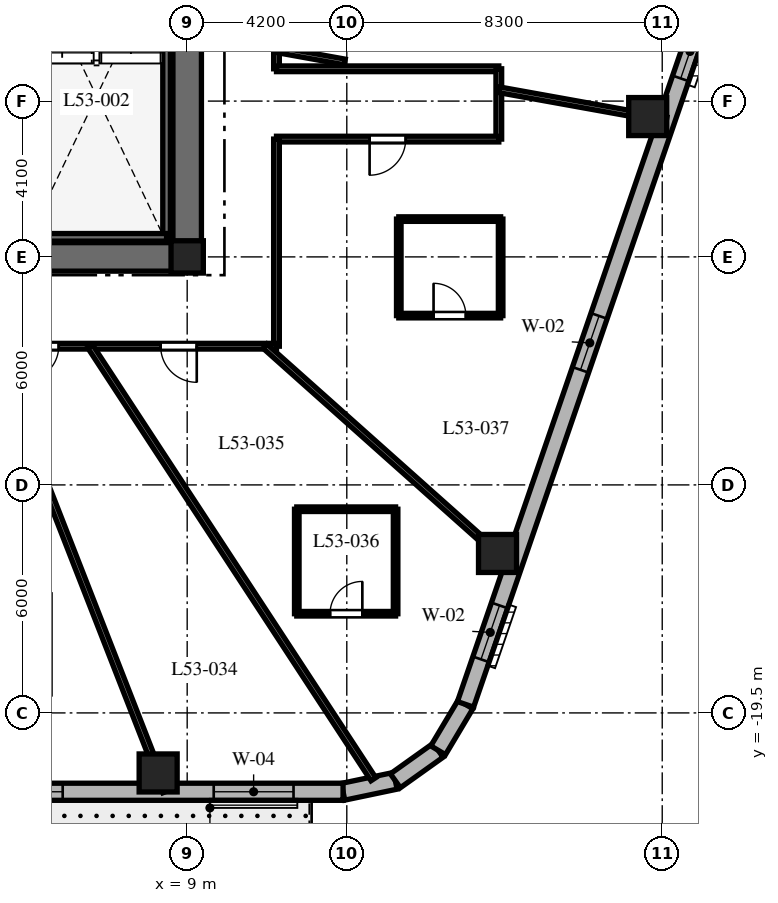
"""IFC4 building model, lengths in metres.
Left out: names, types, materials, properties, quantities, classifications, styles, units other than length and angle.
Written with IfcOpenShell. Run it as: python <this file> out.ifc"""

import sys

from ifc_helpers import new_model, si_unit, direction, frame, frame_2d, origin, origin_2d, place, context, subcontext, project, spatial, rectangle, extrude, element, fill, save


model = new_model("IFC4")
c1 = context("Model", 3, precision=1e-05, world=origin(), true_north=direction((0.0, 1.0)))
c2 = subcontext(c1, "Body", "Model", "MODEL_VIEW")
j1 = project(units=[si_unit("LENGTHUNIT", "METRE"), si_unit("PLANEANGLEUNIT", "RADIAN")], contexts=[c1])
p1 = place(None, origin())
s1 = spatial("IfcSite", under=j1, at=p1, CompositionType="ELEMENT")
p2 = place(p1, origin())
s2 = spatial("IfcBuilding", under=s1, at=p2, CompositionType="ELEMENT")
p3 = place(p2, frame((0.0, 0.0, 214.1)))
s3 = spatial("IfcBuildingStorey", under=s2, at=p3, CompositionType="ELEMENT", Elevation=214.1)
p4 = place(p3, frame((-9.375, -7.5, 0.0), z_axis=(0.0, 0.0, 1.0), x_axis=(1.0, 0.0, 0.0)))
e1 = element("IfcWall", 1, at=p4, inside=s3, PredefinedType="SHEAR", context=c2, shape_type="SweptSolid", body=[
    extrude(rectangle(XDim=18.75, YDim=0.75, at=frame_2d((9.375, 0.0))), origin(), (0.0, 0.0, 1.0), 3.8),
])
p5 = place(p4, frame((9.425, 0.0, 0.0)))
e2 = element("IfcOpeningElement", 2, at=p5, cuts=e1, PredefinedType="OPENING", context=c2, shape_type="SweptSolid", body=[
    extrude(rectangle(XDim=1.0, YDim=2.15, at=frame_2d((0.5, 1.075))), frame((0.0, 0.385, 0.0), z_axis=(0.0, -1.0, 0.0), x_axis=(1.0, 0.0, 0.0)), (0.0, 0.0, 1.0), 0.77),
])
p6 = place(p3, frame((9.0, -7.125, 0.0), z_axis=(0.0, 0.0, 1.0), x_axis=(0.0, 1.0, 0.0)))
e3 = element("IfcWall", 3, at=p6, inside=s3, PredefinedType="SHEAR", context=c2, shape_type="SweptSolid", body=[
    extrude(rectangle(XDim=14.25, YDim=0.75, at=frame_2d((7.125, 0.0))), origin(), (0.0, 0.0, 1.0), 3.8),
])
p7 = place(p6, frame((10.25, 0.0, 0.0)))
e4 = element("IfcOpeningElement", 4, at=p7, cuts=e3, PredefinedType="OPENING", context=c2, shape_type="SweptSolid", body=[
    extrude(rectangle(XDim=1.05, YDim=2.15, at=frame_2d((0.525, 1.075))), frame((0.0, 0.385, 0.0), z_axis=(0.0, -1.0, 0.0), x_axis=(1.0, 0.0, 0.0)), (0.0, 0.0, 1.0), 0.77),
])
p8 = place(p3, frame((8.458, -6.985, 0.0), z_axis=(0.0, 0.0, 1.0), x_axis=(0.0, 1.0, 0.0)))
e5 = element("IfcWall", 5, at=p8, inside=s3, PredefinedType="SHEAR", context=c2, shape_type="SweptSolid", body=[
    extrude(rectangle(XDim=9.143, YDim=0.2, at=frame_2d((4.572, 0.0))), origin(), (0.0, 0.0, 1.0), 3.8),
])
p9 = place(p3, frame((4.772, -6.985, 0.0), z_axis=(0.0, 0.0, 1.0), x_axis=(1.0, 0.0, 0.0)))
e6 = element("IfcWall", 6, at=p9, inside=s3, PredefinedType="SHEAR", context=c2, shape_type="SweptSolid", body=[
    extrude(rectangle(XDim=3.686, YDim=0.2, at=frame_2d((1.843, 0.0))), origin(), (0.0, 0.0, 1.0), 3.8),
])
p10 = place(p3, frame((9.0, -7.5, 0.0), z_axis=(0.0, 0.0, 1.0), x_axis=(1.0, 0.0, 0.0)))
e7 = element("IfcColumn", 7, at=p10, inside=s3, PredefinedType="COLUMN", context=c2, shape_type="SweptSolid", body=[
    extrude(rectangle(XDim=0.85, YDim=0.85, at=origin_2d()), origin(), (0.0, 0.0, 1.0), 3.8),
])
for number, where, z_axis, x_axis in (
    (8, (8.236, -21.08, 0.0), (0.0, 0.0, 1.0), (1.0, 0.0, 0.0)),
    (9, (17.166, -15.304, 0.0), (0.0, 0.0, 1.0), (1.0, 0.0, 0.0)),
    (10, (21.118, -3.807, 0.0), (0.0, 0.0, 1.0), (1.0, 0.0, 0.0)),
):
    element("IfcColumn", number, at=place(p3, frame(where, z_axis=z_axis, x_axis=x_axis)), inside=s3, PredefinedType="COLUMN", context=c2, shape_type="SweptSolid", body=[
        extrude(rectangle(XDim=1.0, YDim=1.0, at=origin_2d()), origin(), (0.0, 0.0, 1.0), 3.8),
    ])
p11 = place(p3, frame((13.102, -21.575, 0.0), z_axis=(0.0, 0.0, 1.0), x_axis=(0.978757421505, 0.205021730188, 0.0)))
e11 = element("IfcWall", 11, at=p11, inside=s3, PredefinedType="SOLIDWALL", context=c2, shape_type="SweptSolid", body=[
    extrude(rectangle(XDim=1.406, YDim=0.45, at=frame_2d((0.703, 0.0))), origin(), (0.0, 0.0, 1.0), 3.5),
])
p12 = place(p3, frame((14.478, -21.287, 0.0), z_axis=(0.0, 0.0, 1.0), x_axis=(0.813888518617, 0.58102106611, 0.0)))
e12 = element("IfcWall", 12, at=p12, inside=s3, PredefinedType="SOLIDWALL", context=c2, shape_type="SweptSolid", body=[
    extrude(rectangle(XDim=1.383, YDim=0.45, at=frame_2d((0.691, 0.0))), origin(), (0.0, 0.0, 1.0), 3.5),
])
p13 = place(p3, frame((15.604, -20.483, 0.0), z_axis=(0.0, 0.0, 1.0), x_axis=(0.512222149036, 0.858852996756, 0.0)))
e13 = element("IfcWall", 13, at=p13, inside=s3, PredefinedType="SOLIDWALL", context=c2, shape_type="SweptSolid", body=[
    extrude(rectangle(XDim=1.406, YDim=0.45, at=frame_2d((0.703, 0.0))), origin(), (0.0, 0.0, 1.0), 3.5),
])
p14 = place(p3, frame((-11.298, -21.575, 0.0), z_axis=(0.0, 0.0, 1.0), x_axis=(1.0, 0.0, 0.0)))
e14 = element("IfcWall", 14, at=p14, inside=s3, PredefinedType="SOLIDWALL", context=c2, shape_type="SweptSolid", body=[
    extrude(rectangle(XDim=24.399, YDim=0.45, at=frame_2d((12.2, 0.0))), origin(), (0.0, 0.0, 1.0), 3.5),
])
p15 = place(p14, frame((2.55, 0.0, 0.0)))
e15 = element("IfcOpeningElement", 15, at=p15, cuts=e14, PredefinedType="OPENING", context=c2, shape_type="SweptSolid", body=[
    extrude(rectangle(XDim=1.0, YDim=2.15, at=frame_2d((0.5, 1.075))), frame((0.0, 0.235, 0.0), z_axis=(0.0, -1.0, 0.0), x_axis=(1.0, 0.0, 0.0)), (0.0, 0.0, 1.0), 0.47),
])
p16 = place(p14, frame((8.169, 0.0, 0.8)))
e16 = element("IfcOpeningElement", 16, at=p16, cuts=e14, PredefinedType="OPENING", context=c2, shape_type="SweptSolid", body=[
    extrude(rectangle(XDim=2.1, YDim=1.85, at=frame_2d((1.05, 0.925))), frame((0.0, 0.235, 0.0), z_axis=(0.0, -1.0, 0.0), x_axis=(1.0, 0.0, 0.0)), (0.0, 0.0, 1.0), 0.47),
])
p17 = place(p14, frame((14.922, 0.0, 0.8)))
e17 = element("IfcOpeningElement", 17, at=p17, cuts=e14, PredefinedType="OPENING", context=c2, shape_type="SweptSolid", body=[
    extrude(rectangle(XDim=2.1, YDim=1.85, at=frame_2d((1.05, 0.925))), frame((0.0, 0.235, 0.0), z_axis=(0.0, -1.0, 0.0), x_axis=(1.0, 0.0, 0.0)), (0.0, 0.0, 1.0), 0.47),
])
p18 = place(p14, frame((20.996, 0.0, 0.8)))
e18 = element("IfcOpeningElement", 18, at=p18, cuts=e14, PredefinedType="OPENING", context=c2, shape_type="SweptSolid", body=[
    extrude(rectangle(XDim=2.1, YDim=1.85, at=frame_2d((1.05, 0.925))), frame((0.0, 0.235, 0.0), z_axis=(0.0, -1.0, 0.0), x_axis=(1.0, 0.0, 0.0)), (0.0, 0.0, 1.0), 0.47),
])
p19 = place(p3, frame((16.324, -19.275, 0.0), z_axis=(0.0, 0.0, 1.0), x_axis=(0.325083142304, 0.945685439557, 0.0)))
e19 = element("IfcWall", 19, at=p19, inside=s3, PredefinedType="SOLIDWALL", context=c2, shape_type="SweptSolid", body=[
    extrude(rectangle(XDim=20.224, YDim=0.45, at=frame_2d((10.112, 0.0))), origin(), (0.0, 0.0, 1.0), 3.5),
])
p20 = place(p19, frame((1.253, 0.0, 0.8)))
e20 = element("IfcOpeningElement", 20, at=p20, cuts=e19, PredefinedType="OPENING", context=c2, shape_type="SweptSolid", body=[
    extrude(rectangle(XDim=1.5, YDim=1.8, at=frame_2d((0.75, 0.9))), frame((0.0, 0.235, 0.0), z_axis=(0.0, -1.0, 0.0), x_axis=(1.0, 0.0, 0.0)), (0.0, 0.0, 1.0), 0.47),
])
p21 = place(p19, frame((9.309, 0.0, 0.8)))
e21 = element("IfcOpeningElement", 21, at=p21, cuts=e19, PredefinedType="OPENING", context=c2, shape_type="SweptSolid", body=[
    extrude(rectangle(XDim=1.5, YDim=1.8, at=frame_2d((0.75, 0.9))), frame((0.0, 0.235, 0.0), z_axis=(0.0, -1.0, 0.0), x_axis=(1.0, 0.0, 0.0)), (0.0, 0.0, 1.0), 0.47),
])
p22 = place(p19, frame((17.418, 0.0, 0.8)))
e22 = element("IfcOpeningElement", 22, at=p22, cuts=e19, PredefinedType="OPENING", context=c2, shape_type="SweptSolid", body=[
    extrude(rectangle(XDim=1.5, YDim=1.8, at=frame_2d((0.75, 0.9))), frame((0.0, 0.235, 0.0), z_axis=(0.0, -1.0, 0.0), x_axis=(1.0, 0.0, 0.0)), (0.0, 0.0, 1.0), 0.47),
])
p23 = place(p3, frame((11.35, 9.85, 0.0), z_axis=(0.0, 0.0, 1.0), x_axis=(0.0, -1.0, 0.0)))
e23 = element("IfcWall", 23, at=p23, inside=s3, PredefinedType="PARTITIONING", context=c2, shape_type="SweptSolid", body=[
    extrude(rectangle(XDim=12.4, YDim=0.15, at=frame_2d((6.2, 0.0))), origin(), (0.0, 0.0, 1.0), 2.99),
])
p24 = place(p23, frame((3.01, 0.0, 0.0)))
e24 = element("IfcOpeningElement", 24, at=p24, cuts=e23, PredefinedType="OPENING", context=c2, shape_type="SweptSolid", body=[
    extrude(rectangle(XDim=0.95, YDim=2.03, at=frame_2d((0.475, 1.015))), frame((0.0, 0.085, 0.0), z_axis=(0.0, -1.0, 0.0), x_axis=(1.0, 0.0, 0.0)), (0.0, 0.0, 1.0), 0.17),
])
p25 = place(p23, frame((8.835, 0.0, 0.0)))
e25 = element("IfcOpeningElement", 25, at=p25, cuts=e23, PredefinedType="OPENING", context=c2, shape_type="SweptSolid", body=[
    extrude(rectangle(XDim=0.95, YDim=2.03, at=frame_2d((0.475, 1.015))), frame((0.0, 0.085, 0.0), z_axis=(0.0, -1.0, 0.0), x_axis=(1.0, 0.0, 0.0)), (0.0, 0.0, 1.0), 0.17),
])
p26 = place(p3, frame((11.35, -2.55, 0.0), z_axis=(0.0, 0.0, 1.0), x_axis=(1.0, 0.0, 0.0)))
e26 = element("IfcWall", 26, at=p26, inside=s3, PredefinedType="PARTITIONING", context=c2, shape_type="SweptSolid", body=[
    extrude(rectangle(XDim=5.85, YDim=0.15, at=frame_2d((2.925, 0.0))), origin(), (0.0, 0.0, 1.0), 2.94),
])
p27 = place(p3, frame((17.2, -2.55, 0.0), z_axis=(0.0, 0.0, 1.0), x_axis=(0.0, -1.0, 0.0)))
e27 = element("IfcWall", 27, at=p27, inside=s3, PredefinedType="PARTITIONING", context=c2, shape_type="SweptSolid", body=[
    extrude(rectangle(XDim=1.85, YDim=0.15, at=frame_2d((0.925, 0.0))), origin(), (0.0, 0.0, 1.0), 2.94),
])
p28 = place(p3, frame((17.2, -4.4, 0.0), z_axis=(0.0, 0.0, 1.0), x_axis=(-1.0, 0.0, 0.0)))
e28 = element("IfcWall", 28, at=p28, inside=s3, PredefinedType="PARTITIONING", context=c2, shape_type="SweptSolid", body=[
    extrude(rectangle(XDim=5.85, YDim=0.15, at=frame_2d((2.925, 0.0))), origin(), (0.0, 0.0, 1.0), 2.94),
])
p29 = place(p28, frame((2.45, 0.0, 0.0)))
e29 = element("IfcOpeningElement", 29, at=p29, cuts=e28, PredefinedType="OPENING", context=c2, shape_type="SweptSolid", body=[
    extrude(rectangle(XDim=0.95, YDim=2.03, at=frame_2d((0.475, 1.015))), frame((0.0, 0.085, 0.0), z_axis=(0.0, -1.0, 0.0), x_axis=(1.0, 0.0, 0.0)), (0.0, 0.0, 1.0), 0.17),
])
p30 = place(p3, frame((11.35, -4.4, 0.0), z_axis=(0.0, 0.0, 1.0), x_axis=(0.0, -1.0, 0.0)))
e30 = element("IfcWall", 30, at=p30, inside=s3, PredefinedType="PARTITIONING", context=c2, shape_type="SweptSolid", body=[
    extrude(rectangle(XDim=5.45, YDim=0.15, at=frame_2d((2.725, 0.0))), origin(), (0.0, 0.0, 1.0), 2.99),
])
p31 = place(p3, frame((11.35, -9.85, 0.0), z_axis=(0.0, 0.0, 1.0), x_axis=(-1.0, 0.0, 0.0)))
e31 = element("IfcWall", 31, at=p31, inside=s3, PredefinedType="PARTITIONING", context=c2, shape_type="SweptSolid", body=[
    extrude(rectangle(XDim=10.43, YDim=0.15, at=frame_2d((5.215, 0.0))), origin(), (0.0, 0.0, 1.0), 2.99),
])
p32 = place(p31, frame((8.362, 0.0, 0.0)))
e32 = element("IfcOpeningElement", 32, at=p32, cuts=e31, PredefinedType="OPENING", context=c2, shape_type="SweptSolid", body=[
    extrude(rectangle(XDim=0.95, YDim=2.03, at=frame_2d((0.475, 1.015))), frame((0.0, 0.085, 0.0), z_axis=(0.0, -1.0, 0.0), x_axis=(1.0, 0.0, 0.0)), (0.0, 0.0, 1.0), 0.17),
])
p33 = place(p31, frame((5.73, 0.0, 0.0)))
e33 = element("IfcOpeningElement", 33, at=p33, cuts=e31, PredefinedType="OPENING", context=c2, shape_type="SweptSolid", body=[
    extrude(rectangle(XDim=0.9, YDim=2.03, at=frame_2d((0.45, 1.015))), frame((0.0, 0.085, 0.0), z_axis=(0.0, -1.0, 0.0), x_axis=(1.0, 0.0, 0.0)), (0.0, 0.0, 1.0), 0.17),
])
p34 = place(p31, frame((2.098, 0.0, 0.0)))
e34 = element("IfcOpeningElement", 34, at=p34, cuts=e31, PredefinedType="OPENING", context=c2, shape_type="SweptSolid", body=[
    extrude(rectangle(XDim=0.95, YDim=2.03, at=frame_2d((0.475, 1.015))), frame((0.0, 0.085, 0.0), z_axis=(0.0, -1.0, 0.0), x_axis=(1.0, 0.0, 0.0)), (0.0, 0.0, 1.0), 0.17),
])
p35 = place(p3, frame((3.848, -9.85, 0.0), z_axis=(0.0, 0.0, 1.0), x_axis=(0.363921778212, -0.931429513889, 0.0)))
e35 = element("IfcWall", 35, at=p35, inside=s3, PredefinedType="PARTITIONING", context=c2, shape_type="SweptSolid", body=[
    extrude(rectangle(XDim=12.588, YDim=0.15, at=frame_2d((6.294, 0.0))), origin(), (0.0, 0.0, 1.0), 2.74),
])
p36 = place(p3, frame((6.444, -9.85, 0.0), z_axis=(0.0, 0.0, 1.0), x_axis=(0.547492333129, -0.836810698525, 0.0)))
e36 = element("IfcWall", 36, at=p36, inside=s3, PredefinedType="PARTITIONING", context=c2, shape_type="SweptSolid", body=[
    extrude(rectangle(XDim=13.616, YDim=0.15, at=frame_2d((6.808, 0.0))), origin(), (0.0, 0.0, 1.0), 2.74),
])
p37 = place(p3, frame((11.048, -9.85, 0.0), z_axis=(0.0, 0.0, 1.0), x_axis=(0.746444434655, -0.665447748492, 0.0)))
e37 = element("IfcWall", 37, at=p37, inside=s3, PredefinedType="PARTITIONING", context=c2, shape_type="SweptSolid", body=[
    extrude(rectangle(XDim=8.732, YDim=0.15, at=frame_2d((4.366, 0.0))), origin(), (0.0, 0.0, 1.0), 2.74),
])
p38 = place(p3, frame((11.35, -2.046, 0.0), z_axis=(0.0, 0.0, 1.0), x_axis=(0.984127783205, -0.177461281195, 0.0)))
e38 = element("IfcWall", 38, at=p38, inside=s3, PredefinedType="PARTITIONING", context=c2, shape_type="SweptSolid", body=[
    extrude(rectangle(XDim=1.826, YDim=0.15, at=frame_2d((0.913, 0.0))), origin(), (0.0, 0.0, 1.0), 3.5),
])
p39 = place(p3, frame((17.2, -3.101, 0.0), z_axis=(0.0, 0.0, 1.0), x_axis=(0.98413465883, -0.177423147559, 0.0)))
e39 = element("IfcWall", 39, at=p39, inside=s3, PredefinedType="PARTITIONING", context=c2, shape_type="SweptSolid", body=[
    extrude(rectangle(XDim=4.482, YDim=0.15, at=frame_2d((2.241, 0.0))), origin(), (0.0, 0.0, 1.0), 2.74),
])
p40 = place(p3, frame((11.884, -16.89, 0.0), z_axis=(0.0, 0.0, 1.0), x_axis=(1.0, 0.0, 0.0)))
e40 = element("IfcWall", 40, at=p40, inside=s3, PredefinedType="PARTITIONING", context=c2, shape_type="SweptSolid", body=[
    extrude(rectangle(XDim=2.6, YDim=0.12, at=frame_2d((1.3, 0.0))), origin(), (0.0, 0.0, 1.0), 2.74),
])
p41 = place(p40, frame((0.875, 0.0, 0.0)))
e41 = element("IfcOpeningElement", 41, at=p41, cuts=e40, PredefinedType="OPENING", context=c2, shape_type="SweptSolid", body=[
    extrude(rectangle(XDim=0.85, YDim=2.03, at=frame_2d((0.425, 1.015))), frame((0.0, 0.07, 0.0), z_axis=(0.0, -1.0, 0.0), x_axis=(1.0, 0.0, 0.0)), (0.0, 0.0, 1.0), 0.14),
])
p42 = place(p3, frame((14.484, -16.89, 0.0), z_axis=(0.0, 0.0, 1.0), x_axis=(0.0, 1.0, 0.0)))
e42 = element("IfcWall", 42, at=p42, inside=s3, PredefinedType="PARTITIONING", context=c2, shape_type="SweptSolid", body=[
    extrude(rectangle(XDim=2.75, YDim=0.12, at=frame_2d((1.375, 0.0))), origin(), (0.0, 0.0, 1.0), 2.74),
])
p43 = place(p3, frame((14.484, -14.14, 0.0), z_axis=(0.0, 0.0, 1.0), x_axis=(-1.0, 0.0, 0.0)))
e43 = element("IfcWall", 43, at=p43, inside=s3, PredefinedType="PARTITIONING", context=c2, shape_type="SweptSolid", body=[
    extrude(rectangle(XDim=2.6, YDim=0.12, at=frame_2d((1.3, 0.0))), origin(), (0.0, 0.0, 1.0), 3.026),
])
p44 = place(p3, frame((11.884, -14.14, 0.0), z_axis=(0.0, 0.0, 1.0), x_axis=(0.0, -1.0, 0.0)))
e44 = element("IfcWall", 44, at=p44, inside=s3, PredefinedType="PARTITIONING", context=c2, shape_type="SweptSolid", body=[
    extrude(rectangle(XDim=2.75, YDim=0.12, at=frame_2d((1.375, 0.0))), origin(), (0.0, 0.0, 1.0), 3.026),
])
p45 = place(p3, frame((14.568, -9.045, 0.0), z_axis=(0.0, 0.0, 1.0), x_axis=(1.0, 0.0, 0.0)))
e45 = element("IfcWall", 45, at=p45, inside=s3, PredefinedType="PARTITIONING", context=c2, shape_type="SweptSolid", body=[
    extrude(rectangle(XDim=2.68, YDim=0.12, at=frame_2d((1.34, 0.0))), origin(), (0.0, 0.0, 1.0), 3.072),
])
p46 = place(p45, frame((0.915, 0.0, 0.0)))
e46 = element("IfcOpeningElement", 46, at=p46, cuts=e45, PredefinedType="OPENING", context=c2, shape_type="SweptSolid", body=[
    extrude(rectangle(XDim=0.85, YDim=2.03, at=frame_2d((0.425, 1.015))), frame((0.0, 0.07, 0.0), z_axis=(0.0, -1.0, 0.0), x_axis=(1.0, 0.0, 0.0)), (0.0, 0.0, 1.0), 0.14),
])
p47 = place(p3, frame((17.248, -9.045, 0.0), z_axis=(0.0, 0.0, 1.0), x_axis=(0.0, 1.0, 0.0)))
e47 = element("IfcWall", 47, at=p47, inside=s3, PredefinedType="PARTITIONING", context=c2, shape_type="SweptSolid", body=[
    extrude(rectangle(XDim=2.54, YDim=0.12, at=frame_2d((1.27, 0.0))), origin(), (0.0, 0.0, 1.0), 3.5),
])
p48 = place(p3, frame((17.248, -6.505, 0.0), z_axis=(0.0, 0.0, 1.0), x_axis=(-1.0, 0.0, 0.0)))
e48 = element("IfcWall", 48, at=p48, inside=s3, PredefinedType="PARTITIONING", context=c2, shape_type="SweptSolid", body=[
    extrude(rectangle(XDim=2.68, YDim=0.12, at=frame_2d((1.34, 0.0))), origin(), (0.0, 0.0, 1.0), 3.072),
])
p49 = place(p3, frame((14.568, -6.505, 0.0), z_axis=(0.0, 0.0, 1.0), x_axis=(0.0, -1.0, 0.0)))
e49 = element("IfcWall", 49, at=p49, inside=s3, PredefinedType="PARTITIONING", context=c2, shape_type="SweptSolid", body=[
    extrude(rectangle(XDim=2.54, YDim=0.12, at=frame_2d((1.27, 0.0))), origin(), (0.0, 0.0, 1.0), 3.5),
])
p50 = place(p17, origin())
e50 = element("IfcWindow", 50, at=p50, inside=s3, PartitioningType="SINGLE_PANEL", PredefinedType="WINDOW", context=c2, shape_type="SweptSolid", body=[
    extrude(rectangle(XDim=2.1, YDim=1.85, at=frame_2d((1.05, 0.925))), frame((0.0, 0.03, 0.0), z_axis=(0.0, -1.0, 0.0), x_axis=(1.0, 0.0, 0.0)), (0.0, 0.0, 1.0), 0.06),
])
fill(e17, e50)
p51 = place(p18, origin())
e51 = element("IfcWindow", 51, at=p51, inside=s3, PartitioningType="SINGLE_PANEL", PredefinedType="WINDOW", context=c2, shape_type="SweptSolid", body=[
    extrude(rectangle(XDim=2.1, YDim=1.85, at=frame_2d((1.05, 0.925))), frame((0.0, 0.03, 0.0), z_axis=(0.0, -1.0, 0.0), x_axis=(1.0, 0.0, 0.0)), (0.0, 0.0, 1.0), 0.06),
])
fill(e18, e51)
p52 = place(p20, origin())
e52 = element("IfcWindow", 52, at=p52, inside=s3, PartitioningType="SINGLE_PANEL", PredefinedType="WINDOW", context=c2, shape_type="SweptSolid", body=[
    extrude(rectangle(XDim=1.5, YDim=1.8, at=frame_2d((0.75, 0.9))), frame((0.0, 0.03, 0.0), z_axis=(0.0, -1.0, 0.0), x_axis=(1.0, 0.0, 0.0)), (0.0, 0.0, 1.0), 0.06),
])
fill(e20, e52)
p53 = place(p21, origin())
e53 = element("IfcWindow", 53, at=p53, inside=s3, PartitioningType="SINGLE_PANEL", PredefinedType="WINDOW", context=c2, shape_type="SweptSolid", body=[
    extrude(rectangle(XDim=1.5, YDim=1.8, at=frame_2d((0.75, 0.9))), frame((0.0, 0.03, 0.0), z_axis=(0.0, -1.0, 0.0), x_axis=(1.0, 0.0, 0.0)), (0.0, 0.0, 1.0), 0.06),
])
fill(e21, e53)
p54 = place(p22, origin())
e54 = element("IfcWindow", 54, at=p54, inside=s3, PartitioningType="SINGLE_PANEL", PredefinedType="WINDOW", context=c2, shape_type="SweptSolid", body=[
    extrude(rectangle(XDim=1.5, YDim=1.8, at=frame_2d((0.75, 0.9))), frame((0.0, 0.03, 0.0), z_axis=(0.0, -1.0, 0.0), x_axis=(1.0, 0.0, 0.0)), (0.0, 0.0, 1.0), 0.06),
])
fill(e22, e54)
p55 = place(p33, origin())
e55 = element("IfcDoor", 55, at=p55, inside=s3, OperationType="SINGLE_SWING_RIGHT", PredefinedType="DOOR", context=c2, shape_type="SweptSolid", body=[
    extrude(rectangle(XDim=0.9, YDim=2.03, at=frame_2d((0.45, 1.015))), frame((0.0, 0.025, 0.0), z_axis=(0.0, -1.0, 0.0), x_axis=(1.0, 0.0, 0.0)), (0.0, 0.0, 1.0), 0.05),
])
fill(e33, e55)
p56 = place(p34, origin())
e56 = element("IfcDoor", 56, at=p56, inside=s3, OperationType="SINGLE_SWING_LEFT", PredefinedType="DOOR", context=c2, shape_type="SweptSolid", body=[
    extrude(rectangle(XDim=0.95, YDim=2.03, at=frame_2d((0.475, 1.015))), frame((0.0, 0.025, 0.0), z_axis=(0.0, -1.0, 0.0), x_axis=(1.0, 0.0, 0.0)), (0.0, 0.0, 1.0), 0.05),
])
fill(e34, e56)
p57 = place(p41, origin())
e57 = element("IfcDoor", 57, at=p57, inside=s3, OperationType="SINGLE_SWING_RIGHT", PredefinedType="DOOR", context=c2, shape_type="SweptSolid", body=[
    extrude(rectangle(XDim=0.85, YDim=2.03, at=frame_2d((0.425, 1.015))), frame((0.0, 0.025, 0.0), z_axis=(0.0, -1.0, 0.0), x_axis=(1.0, 0.0, 0.0)), (0.0, 0.0, 1.0), 0.05),
])
fill(e41, e57)
p58 = place(p29, origin())
e58 = element("IfcDoor", 58, at=p58, inside=s3, OperationType="SINGLE_SWING_RIGHT", PredefinedType="DOOR", context=c2, shape_type="SweptSolid", body=[
    extrude(rectangle(XDim=0.95, YDim=2.03, at=frame_2d((0.475, 1.015))), frame((0.0, 0.025, 0.0), z_axis=(0.0, -1.0, 0.0), x_axis=(1.0, 0.0, 0.0)), (0.0, 0.0, 1.0), 0.05),
])
fill(e29, e58)
p59 = place(p46, origin())
e59 = element("IfcDoor", 59, at=p59, inside=s3, OperationType="SINGLE_SWING_LEFT", PredefinedType="DOOR", context=c2, shape_type="SweptSolid", body=[
    extrude(rectangle(XDim=0.85, YDim=2.03, at=frame_2d((0.425, 1.015))), frame((0.0, 0.025, 0.0), z_axis=(0.0, -1.0, 0.0), x_axis=(1.0, 0.0, 0.0)), (0.0, 0.0, 1.0), 0.05),
])
fill(e46, e59)
save(model, sys.argv[1])
